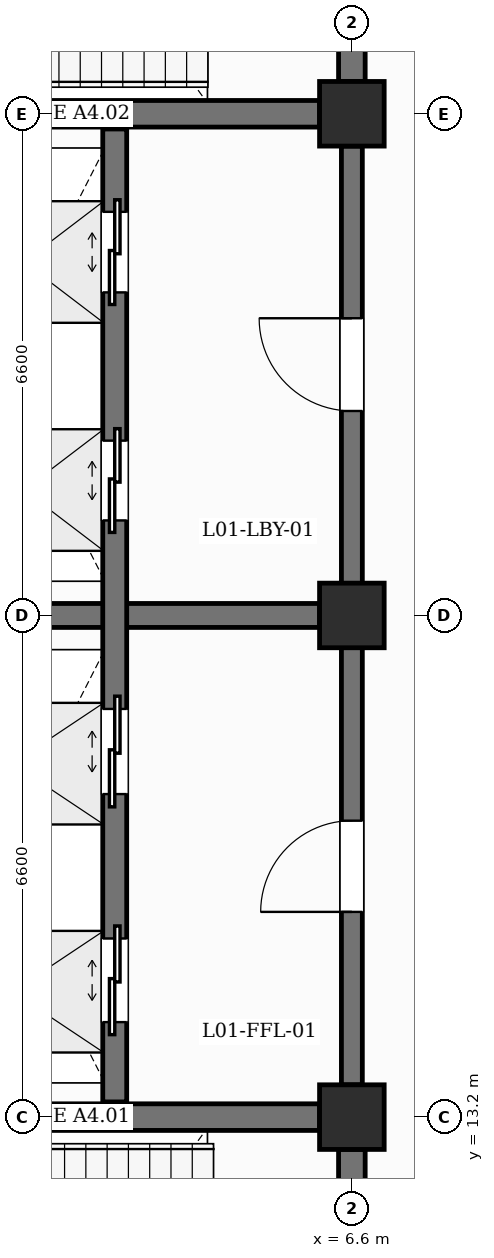
"""IFC4 building model, lengths in metres.
Left out: names, types, materials, properties, quantities, classifications, styles, units other than length and angle.
Written with IfcOpenShell. Run it as: python <this file> out.ifc"""

import sys

from ifc_helpers import new_model, si_unit, direction, frame, frame_2d, origin, origin_2d, place, context, subcontext, project, spatial, rectangle, extrude, element, fill, save


model = new_model("IFC4")
c1 = context("Model", 3, precision=1e-05, world=origin(), true_north=direction((0.0, 1.0)))
c2 = subcontext(c1, "Body", "Model", "MODEL_VIEW")
j1 = project(units=[si_unit("LENGTHUNIT", "METRE"), si_unit("PLANEANGLEUNIT", "RADIAN")], contexts=[c1])
p1 = place(None, origin())
s1 = spatial("IfcSite", under=j1, at=p1, CompositionType="ELEMENT")
p2 = place(p1, origin())
s2 = spatial("IfcBuilding", under=s1, at=p2, CompositionType="ELEMENT")
p3 = place(p2, frame((0.0, 0.0, 5.4)))
s3 = spatial("IfcBuildingStorey", under=s2, at=p3, CompositionType="ELEMENT", Elevation=5.4)
for number, where, z_axis, x_axis in (
    (1, (6.6, 13.2, 0.0), (0.0, 0.0, 1.0), (1.0, 0.0, 0.0)),
    (2, (6.6, 19.8, 0.0), (0.0, 0.0, 1.0), (1.0, 0.0, 0.0)),
    (3, (6.6, 26.4, 0.0), (0.0, 0.0, 1.0), (1.0, 0.0, 0.0)),
):
    element("IfcColumn", number, at=place(p3, frame(where, z_axis=z_axis, x_axis=x_axis)), inside=s3, PredefinedType="COLUMN", context=c2, shape_type="SweptSolid", body=[
        extrude(rectangle(XDim=0.85, YDim=0.85, at=origin_2d()), origin(), (0.0, 0.0, 1.0), 4.8),
    ])
p4 = place(p3, frame((0.425, 13.2, 0.0), z_axis=(0.0, 0.0, 1.0), x_axis=(1.0, 0.0, 0.0)))
e4 = element("IfcWall", 4, at=p4, inside=s3, PredefinedType="SHEAR", context=c2, shape_type="SweptSolid", body=[
    extrude(rectangle(XDim=5.75, YDim=0.35, at=frame_2d((2.875, 0.0))), origin(), (0.0, 0.0, 1.0), 3.6),
])
p5 = place(p3, frame((6.6, 7.025, 0.0), z_axis=(0.0, 0.0, 1.0), x_axis=(0.0, 1.0, 0.0)))
e5 = element("IfcWall", 5, at=p5, inside=s3, PredefinedType="SHEAR", context=c2, shape_type="SweptSolid", body=[
    extrude(rectangle(XDim=5.75, YDim=0.35, at=frame_2d((2.875, 0.0))), origin(), (0.0, 0.0, 1.0), 3.7),
])
p6 = place(p5, frame((2.325, 0.0, 0.0)))
e6 = element("IfcOpeningElement", 6, at=p6, cuts=e5, PredefinedType="OPENING", context=c2, shape_type="SweptSolid", body=[
    extrude(rectangle(XDim=1.1, YDim=2.15, at=frame_2d((0.55, 1.075))), frame((0.0, 0.185, 0.0), z_axis=(0.0, -1.0, 0.0), x_axis=(1.0, 0.0, 0.0)), (0.0, 0.0, 1.0), 0.37),
])
p7 = place(p3, frame((0.425, 26.4, 0.0), z_axis=(0.0, 0.0, 1.0), x_axis=(1.0, 0.0, 0.0)))
e7 = element("IfcWall", 7, at=p7, inside=s3, PredefinedType="SHEAR", context=c2, shape_type="SweptSolid", body=[
    extrude(rectangle(XDim=5.75, YDim=0.35, at=frame_2d((2.875, 0.0))), origin(), (0.0, 0.0, 1.0), 3.6),
])
p8 = place(p3, frame((6.6, 26.825, 0.0), z_axis=(0.0, 0.0, 1.0), x_axis=(0.0, 1.0, 0.0)))
e8 = element("IfcWall", 8, at=p8, inside=s3, PredefinedType="SHEAR", context=c2, shape_type="SweptSolid", body=[
    extrude(rectangle(XDim=5.75, YDim=0.35, at=frame_2d((2.875, 0.0))), origin(), (0.0, 0.0, 1.0), 3.7),
])
p9 = place(p8, frame((2.325, 0.0, 0.0)))
e9 = element("IfcOpeningElement", 9, at=p9, cuts=e8, PredefinedType="OPENING", context=c2, shape_type="SweptSolid", body=[
    extrude(rectangle(XDim=1.1, YDim=2.15, at=frame_2d((0.55, 1.075))), frame((0.0, 0.185, 0.0), z_axis=(0.0, -1.0, 0.0), x_axis=(1.0, 0.0, 0.0)), (0.0, 0.0, 1.0), 0.37),
])
p10 = place(p3, frame((0.425, 19.8, 0.0), z_axis=(0.0, 0.0, 1.0), x_axis=(1.0, 0.0, 0.0)))
e10 = element("IfcWall", 10, at=p10, inside=s3, PredefinedType="SHEAR", context=c2, shape_type="SweptSolid", body=[
    extrude(rectangle(XDim=5.75, YDim=0.315, at=frame_2d((2.875, 0.0))), origin(), (0.0, 0.0, 1.0), 3.7),
])
p11 = place(p3, frame((6.6, 13.625, 0.0), z_axis=(0.0, 0.0, 1.0), x_axis=(0.0, 1.0, 0.0)))
e11 = element("IfcWall", 11, at=p11, inside=s3, PredefinedType="SHEAR", context=c2, shape_type="SweptSolid", body=[
    extrude(rectangle(XDim=5.75, YDim=0.275, at=frame_2d((2.875, 0.0))), origin(), (0.0, 0.0, 1.0), 3.7),
])
p12 = place(p11, frame((2.275, 0.0, 0.0)))
e12 = element("IfcOpeningElement", 12, at=p12, cuts=e11, PredefinedType="OPENING", context=c2, shape_type="SweptSolid", body=[
    extrude(rectangle(XDim=1.2, YDim=2.25, at=frame_2d((0.6, 1.125))), frame((0.0, 0.147, 0.0), z_axis=(0.0, -1.0, 0.0), x_axis=(1.0, 0.0, 0.0)), (0.0, 0.0, 1.0), 0.295),
])
p13 = place(p3, frame((6.6, 20.225, 0.0), z_axis=(0.0, 0.0, 1.0), x_axis=(0.0, 1.0, 0.0)))
e13 = element("IfcWall", 13, at=p13, inside=s3, PredefinedType="SHEAR", context=c2, shape_type="SweptSolid", body=[
    extrude(rectangle(XDim=5.75, YDim=0.275, at=frame_2d((2.875, 0.0))), origin(), (0.0, 0.0, 1.0), 3.7),
])
p14 = place(p13, frame((2.265, 0.0, 0.0)))
e14 = element("IfcOpeningElement", 14, at=p14, cuts=e13, PredefinedType="OPENING", context=c2, shape_type="SweptSolid", body=[
    extrude(rectangle(XDim=1.22, YDim=2.15, at=frame_2d((0.61, 1.075))), frame((0.0, 0.147, 0.0), z_axis=(0.0, -1.0, 0.0), x_axis=(1.0, 0.0, 0.0)), (0.0, 0.0, 1.0), 0.295),
])
p15 = place(p3, frame((3.48, 13.4, 0.0), z_axis=(0.0, 0.0, 1.0), x_axis=(0.0, 1.0, 0.0)))
e15 = element("IfcWall", 15, at=p15, inside=s3, PredefinedType="SHEAR", context=c2, shape_type="SweptSolid", body=[
    extrude(rectangle(XDim=6.2, YDim=0.315, at=frame_2d((3.1, 0.0))), origin(), (0.0, 0.0, 1.0), 4.45),
])
p16 = place(p15, frame((1.05, 0.0, 0.0)))
e16 = element("IfcOpeningElement", 16, at=p16, cuts=e15, PredefinedType="OPENING", context=c2, shape_type="SweptSolid", body=[
    extrude(rectangle(XDim=1.1, YDim=2.15, at=frame_2d((0.55, 1.075))), frame((0.0, 0.167, 0.0), z_axis=(0.0, -1.0, 0.0), x_axis=(1.0, 0.0, 0.0)), (0.0, 0.0, 1.0), 0.335),
])
p17 = place(p15, frame((4.05, 0.0, 0.0)))
e17 = element("IfcOpeningElement", 17, at=p17, cuts=e15, PredefinedType="OPENING", context=c2, shape_type="SweptSolid", body=[
    extrude(rectangle(XDim=1.12, YDim=2.15, at=frame_2d((0.56, 1.075))), frame((0.0, 0.167, 0.0), z_axis=(0.0, -1.0, 0.0), x_axis=(1.0, 0.0, 0.0)), (0.0, 0.0, 1.0), 0.335),
])
p18 = place(p3, frame((3.48, 20.0, 0.0), z_axis=(0.0, 0.0, 1.0), x_axis=(0.0, 1.0, 0.0)))
e18 = element("IfcWall", 18, at=p18, inside=s3, PredefinedType="SHEAR", context=c2, shape_type="SweptSolid", body=[
    extrude(rectangle(XDim=6.2, YDim=0.315, at=frame_2d((3.1, 0.0))), origin(), (0.0, 0.0, 1.0), 4.45),
])
p19 = place(p18, frame((1.05, 0.0, 0.0)))
e19 = element("IfcOpeningElement", 19, at=p19, cuts=e18, PredefinedType="OPENING", context=c2, shape_type="SweptSolid", body=[
    extrude(rectangle(XDim=1.05, YDim=2.15, at=frame_2d((0.525, 1.075))), frame((0.0, 0.167, 0.0), z_axis=(0.0, -1.0, 0.0), x_axis=(1.0, 0.0, 0.0)), (0.0, 0.0, 1.0), 0.335),
])
p20 = place(p18, frame((4.05, 0.0, 0.0)))
e20 = element("IfcOpeningElement", 20, at=p20, cuts=e18, PredefinedType="OPENING", context=c2, shape_type="SweptSolid", body=[
    extrude(rectangle(XDim=1.06, YDim=2.15, at=frame_2d((0.53, 1.075))), frame((0.0, 0.167, 0.0), z_axis=(0.0, -1.0, 0.0), x_axis=(1.0, 0.0, 0.0)), (0.0, 0.0, 1.0), 0.335),
])
p21 = place(p16, origin())
e21 = element("IfcDoor", 21, at=p21, inside=s3, OperationType="DOUBLE_DOOR_SLIDING", PredefinedType="USERDEFINED", context=c2, shape_type="SweptSolid", body=[
    extrude(rectangle(XDim=1.1, YDim=2.15, at=frame_2d((0.55, 1.075))), frame((0.0, 0.025, 0.0), z_axis=(0.0, -1.0, 0.0), x_axis=(1.0, 0.0, 0.0)), (0.0, 0.0, 1.0), 0.05),
])
fill(e16, e21)
p22 = place(p17, origin())
e22 = element("IfcDoor", 22, at=p22, inside=s3, OperationType="DOUBLE_DOOR_SLIDING", PredefinedType="USERDEFINED", context=c2, shape_type="SweptSolid", body=[
    extrude(rectangle(XDim=1.12, YDim=2.15, at=frame_2d((0.56, 1.075))), frame((0.0, 0.025, 0.0), z_axis=(0.0, -1.0, 0.0), x_axis=(1.0, 0.0, 0.0)), (0.0, 0.0, 1.0), 0.05),
])
fill(e17, e22)
p23 = place(p19, origin())
e23 = element("IfcDoor", 23, at=p23, inside=s3, OperationType="DOUBLE_DOOR_SLIDING", PredefinedType="USERDEFINED", context=c2, shape_type="SweptSolid", body=[
    extrude(rectangle(XDim=1.05, YDim=2.15, at=frame_2d((0.525, 1.075))), frame((0.0, 0.025, 0.0), z_axis=(0.0, -1.0, 0.0), x_axis=(1.0, 0.0, 0.0)), (0.0, 0.0, 1.0), 0.05),
])
fill(e19, e23)
p24 = place(p20, origin())
e24 = element("IfcDoor", 24, at=p24, inside=s3, OperationType="DOUBLE_DOOR_SLIDING", PredefinedType="USERDEFINED", context=c2, shape_type="SweptSolid", body=[
    extrude(rectangle(XDim=1.06, YDim=2.15, at=frame_2d((0.53, 1.075))), frame((0.0, 0.025, 0.0), z_axis=(0.0, -1.0, 0.0), x_axis=(1.0, 0.0, 0.0)), (0.0, 0.0, 1.0), 0.05),
])
fill(e20, e24)
p25 = place(p12, origin())
e25 = element("IfcDoor", 25, at=p25, inside=s3, OperationType="SINGLE_SWING_LEFT", PredefinedType="DOOR", context=c2, shape_type="SweptSolid", body=[
    extrude(rectangle(XDim=1.2, YDim=2.25, at=frame_2d((0.6, 1.125))), frame((0.0, 0.025, 0.0), z_axis=(0.0, -1.0, 0.0), x_axis=(1.0, 0.0, 0.0)), (0.0, 0.0, 1.0), 0.05),
])
fill(e12, e25)
p26 = place(p14, origin())
e26 = element("IfcDoor", 26, at=p26, inside=s3, OperationType="SINGLE_SWING_RIGHT", PredefinedType="DOOR", context=c2, shape_type="SweptSolid", body=[
    extrude(rectangle(XDim=1.22, YDim=2.15, at=frame_2d((0.61, 1.075))), frame((0.0, 0.025, 0.0), z_axis=(0.0, -1.0, 0.0), x_axis=(1.0, 0.0, 0.0)), (0.0, 0.0, 1.0), 0.05),
])
fill(e14, e26)
save(model, sys.argv[1])
